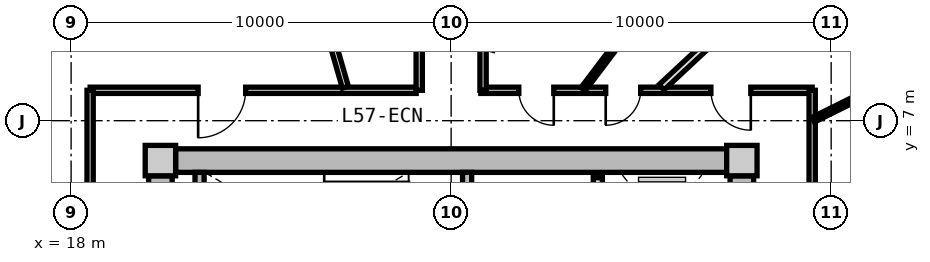
"""IFC4 building model, lengths in metres.
Left out: names, types, materials, properties, quantities, classifications, styles, units other than length and angle.
Written with IfcOpenShell. Run it as: python <this file> out.ifc"""

import sys

from ifc_helpers import new_model, si_unit, direction, frame, frame_2d, origin, origin_2d, place, context, subcontext, project, spatial, rectangle, extrude, source, transform, mapped, element, fill, save


model = new_model("IFC4")
c1 = context("Model", 3, precision=1e-05, world=origin(), true_north=direction((0.0, 1.0)))
c2 = subcontext(c1, "Body", "Model", "MODEL_VIEW")
j1 = project(units=[si_unit("LENGTHUNIT", "METRE"), si_unit("PLANEANGLEUNIT", "RADIAN")], contexts=[c1])
p1 = place(None, origin())
s1 = spatial("IfcSite", under=j1, at=p1, CompositionType="ELEMENT")
p2 = place(p1, origin())
s2 = spatial("IfcBuilding", under=s1, at=p2, CompositionType="ELEMENT")
p3 = place(p2, frame((0.0, 0.0, 183.1)))
s3 = spatial("IfcBuildingStorey", under=s2, at=p3, CompositionType="ELEMENT", Elevation=183.1)
m1 = source(origin(), c2, "Body", "SweptSolid", [
    extrude(rectangle(XDim=0.8, YDim=0.8, at=origin_2d()), origin(), (0.0, 0.0, 1.0), 3.05),
])
for number, where, z_axis, x_axis in (
    (1, (35.65, 5.95, 0.0), (0.0, 0.0, 1.0), (1.0, 0.0, 0.0)),
    (2, (20.35, 5.95, 0.0), (0.0, 0.0, 1.0), (1.0, 0.0, 0.0)),
):
    element("IfcColumn", number, at=place(p3, frame(where, z_axis=z_axis, x_axis=x_axis)), inside=s3, PredefinedType="COLUMN", context=c2, shape_type="MappedRepresentation", body=[
        mapped(m1, transform((0.0, 0.0, 0.0), x_axis=(1.0, 0.0, 0.0), y_axis=(0.0, 1.0, 0.0), z_axis=(0.0, 0.0, 1.0), scale=1.0)),
    ])
m2 = source(origin(), c2, "Body", "SweptSolid", [
    extrude(rectangle(XDim=14.5, YDim=0.62, at=frame_2d((7.25, 0.0))), origin(), (0.0, 0.0, 1.0), 2.73),
])
p4 = place(p3, frame((20.75, 5.95, 0.0), z_axis=(0.0, 0.0, 1.0), x_axis=(1.0, 0.0, 0.0)))
e3 = element("IfcWall", 3, at=p4, inside=s3, PredefinedType="SHEAR", context=c2, shape_type="MappedRepresentation", body=[
    mapped(m2, transform((0.0, 0.0, 0.0), x_axis=(1.0, 0.0, 0.0), y_axis=(0.0, 1.0, 0.0), z_axis=(0.0, 0.0, 1.0), scale=1.0)),
])
m3 = source(origin(), c2, "Body", "SweptSolid", [
    extrude(rectangle(XDim=11.1, YDim=0.62, at=frame_2d((5.55, 0.0))), origin(), (0.0, 0.0, 1.0), 2.73),
])
p5 = place(p3, frame((20.35, -5.55, 0.0), z_axis=(0.0, 0.0, 1.0), x_axis=(0.0, 1.0, 0.0)))
e4 = element("IfcWall", 4, at=p5, inside=s3, PredefinedType="SHEAR", context=c2, shape_type="MappedRepresentation", body=[
    mapped(m3, transform((0.0, 0.0, 0.0), x_axis=(1.0, 0.0, 0.0), y_axis=(0.0, 1.0, 0.0), z_axis=(0.0, 0.0, 1.0), scale=1.0)),
])
p6 = place(p5, frame((3.8, 0.0, 0.0)))
e5 = element("IfcOpeningElement", 5, at=p6, cuts=e4, PredefinedType="OPENING", context=c2, shape_type="SweptSolid", body=[
    extrude(rectangle(XDim=1.2, YDim=2.15, at=frame_2d((0.6, 1.075))), frame((0.0, 0.32, 0.0), z_axis=(0.0, -1.0, 0.0), x_axis=(1.0, 0.0, 0.0)), (0.0, 0.0, 1.0), 0.64),
])
p7 = place(p3, frame((35.65, 5.55, 0.0), z_axis=(0.0, 0.0, 1.0), x_axis=(0.0, -1.0, 0.0)))
e6 = element("IfcWall", 6, at=p7, inside=s3, PredefinedType="SHEAR", context=c2, shape_type="MappedRepresentation", body=[
    mapped(m3, transform((0.0, 0.0, 0.0), x_axis=(1.0, 0.0, 0.0), y_axis=(0.0, 1.0, 0.0), z_axis=(0.0, 0.0, 1.0), scale=1.0)),
])
p8 = place(p7, frame((5.65, 0.0, 0.0)))
e7 = element("IfcOpeningElement", 7, at=p8, cuts=e6, PredefinedType="OPENING", context=c2, shape_type="SweptSolid", body=[
    extrude(rectangle(XDim=1.2, YDim=2.15, at=frame_2d((0.6, 1.075))), frame((0.0, 0.32, 0.0), z_axis=(0.0, -1.0, 0.0), x_axis=(1.0, 0.0, 0.0)), (0.0, 0.0, 1.0), 0.64),
])
m4 = source(origin(), c2, "Body", "SweptSolid", [
    extrude(rectangle(XDim=3.19, YDim=0.24, at=frame_2d((1.595, 0.0))), origin(), (0.0, 0.0, 1.0), 2.73),
])
p9 = place(p3, frame((21.38, 2.45, 0.0), z_axis=(0.0, 0.0, 1.0), x_axis=(0.0, 1.0, 0.0)))
e8 = element("IfcWall", 8, at=p9, inside=s3, PredefinedType="PARTITIONING", context=c2, shape_type="MappedRepresentation", body=[
    mapped(m4, transform((0.0, 0.0, 0.0), x_axis=(1.0, 0.0, 0.0), y_axis=(0.0, 1.0, 0.0), z_axis=(0.0, 0.0, 1.0), scale=1.0)),
])
p10 = place(p3, frame((28.42, 2.45, 0.0), z_axis=(0.0, 0.0, 1.0), x_axis=(0.0, 1.0, 0.0)))
e9 = element("IfcWall", 9, at=p10, inside=s3, PredefinedType="PARTITIONING", context=c2, shape_type="MappedRepresentation", body=[
    mapped(m4, transform((0.0, 0.0, 0.0), x_axis=(1.0, 0.0, 0.0), y_axis=(0.0, 1.0, 0.0), z_axis=(0.0, 0.0, 1.0), scale=1.0)),
])
p11 = place(p10, frame((0.55, 0.0, 0.0)))
e10 = element("IfcOpeningElement", 10, at=p11, cuts=e9, PredefinedType="OPENING", context=c2, shape_type="SweptSolid", body=[
    extrude(rectangle(XDim=1.1, YDim=2.15, at=frame_2d((0.55, 1.075))), frame((0.0, 0.13, 0.0), z_axis=(0.0, -1.0, 0.0), x_axis=(1.0, 0.0, 0.0)), (0.0, 0.0, 1.0), 0.26),
])
m5 = source(origin(), c2, "Body", "SweptSolid", [
    extrude(rectangle(XDim=5.0, YDim=0.24, at=frame_2d((2.5, 0.0))), origin(), (0.0, 0.0, 1.0), 2.715),
])
p12 = place(p3, frame((31.86, 0.5, 0.0), z_axis=(0.0, 0.0, 1.0), x_axis=(0.0, 1.0, 0.0)))
e11 = element("IfcWall", 11, at=p12, inside=s3, PredefinedType="PARTITIONING", context=c2, shape_type="MappedRepresentation", body=[
    mapped(m5, transform((0.0, 0.0, 0.0), x_axis=(1.0, 0.0, 0.0), y_axis=(0.0, 1.0, 0.0), z_axis=(0.0, 0.0, 1.0), scale=1.0)),
])
p13 = place(p12, frame((3.05, 0.0, 0.0)))
e12 = element("IfcOpeningElement", 12, at=p13, cuts=e11, PredefinedType="OPENING", context=c2, shape_type="SweptSolid", body=[
    extrude(rectangle(XDim=1.3, YDim=2.2, at=frame_2d((0.65, 1.1))), frame((0.0, 0.13, 0.0), z_axis=(0.0, -1.0, 0.0), x_axis=(1.0, 0.0, 0.0)), (0.0, 0.0, 1.0), 0.26),
])
p14 = place(p12, frame((0.55, 0.0, 0.0)))
e13 = element("IfcOpeningElement", 13, at=p14, cuts=e11, PredefinedType="OPENING", context=c2, shape_type="SweptSolid", body=[
    extrude(rectangle(XDim=1.3, YDim=2.2, at=frame_2d((0.65, 1.1))), frame((0.0, 0.13, 0.0), z_axis=(0.0, -1.0, 0.0), x_axis=(1.0, 0.0, 0.0)), (0.0, 0.0, 1.0), 0.26),
])
m6 = source(origin(), c2, "Body", "SweptSolid", [
    extrude(rectangle(XDim=8.58, YDim=0.165, at=frame_2d((4.29, 0.0))), origin(), (0.0, 0.0, 1.0), 2.715),
])
p15 = place(p3, frame((18.5, 7.8, 0.0), z_axis=(0.0, 0.0, 1.0), x_axis=(1.0, 0.0, 0.0)))
e14 = element("IfcWall", 14, at=p15, inside=s3, PredefinedType="PARTITIONING", context=c2, shape_type="MappedRepresentation", body=[
    mapped(m6, transform((0.0, 0.0, 0.0), x_axis=(1.0, 0.0, 0.0), y_axis=(0.0, 1.0, 0.0), z_axis=(0.0, 0.0, 1.0), scale=1.0)),
])
p16 = place(p15, frame((2.843, 0.0, 0.0)))
e15 = element("IfcOpeningElement", 15, at=p16, cuts=e14, PredefinedType="OPENING", context=c2, shape_type="SweptSolid", body=[
    extrude(rectangle(XDim=1.25, YDim=2.2, at=frame_2d((0.625, 1.1))), frame((0.0, 0.093, 0.0), z_axis=(0.0, -1.0, 0.0), x_axis=(1.0, 0.0, 0.0)), (0.0, 0.0, 1.0), 0.185),
])
m7 = source(origin(), c2, "Body", "SweptSolid", [
    extrude(rectangle(XDim=8.719, YDim=0.165, at=frame_2d((4.36, 0.0))), origin(), (0.0, 0.0, 1.0), 2.715),
])
p17 = place(p3, frame((28.781, 7.8, 0.0), z_axis=(0.0, 0.0, 1.0), x_axis=(1.0, 0.0, 0.0)))
e16 = element("IfcWall", 16, at=p17, inside=s3, PredefinedType="PARTITIONING", context=c2, shape_type="MappedRepresentation", body=[
    mapped(m7, transform((0.0, 0.0, 0.0), x_axis=(1.0, 0.0, 0.0), y_axis=(0.0, 1.0, 0.0), z_axis=(0.0, 0.0, 1.0), scale=1.0)),
])
p18 = place(p17, frame((6.054, 0.0, 0.0)))
e17 = element("IfcOpeningElement", 17, at=p18, cuts=e16, PredefinedType="OPENING", context=c2, shape_type="SweptSolid", body=[
    extrude(rectangle(XDim=1.05, YDim=2.15, at=frame_2d((0.525, 1.075))), frame((0.0, 0.093, 0.0), z_axis=(0.0, -1.0, 0.0), x_axis=(1.0, 0.0, 0.0)), (0.0, 0.0, 1.0), 0.185),
])
p19 = place(p17, frame((3.287, 0.0, 0.0)))
e18 = element("IfcOpeningElement", 18, at=p19, cuts=e16, PredefinedType="OPENING", context=c2, shape_type="SweptSolid", body=[
    extrude(rectangle(XDim=0.92, YDim=2.1, at=frame_2d((0.46, 1.05))), frame((0.0, 0.093, 0.0), z_axis=(0.0, -1.0, 0.0), x_axis=(1.0, 0.0, 0.0)), (0.0, 0.0, 1.0), 0.185),
])
p20 = place(p17, frame((1.0, 0.0, 0.0)))
e19 = element("IfcOpeningElement", 19, at=p20, cuts=e16, PredefinedType="OPENING", context=c2, shape_type="SweptSolid", body=[
    extrude(rectangle(XDim=0.92, YDim=2.1, at=frame_2d((0.46, 1.05))), frame((0.0, 0.093, 0.0), z_axis=(0.0, -1.0, 0.0), x_axis=(1.0, 0.0, 0.0)), (0.0, 0.0, 1.0), 0.185),
])
m8 = source(origin(), c2, "Body", "SweptSolid", [
    extrude(rectangle(XDim=6.88, YDim=0.165, at=frame_2d((3.44, 0.0))), origin(), (0.0, 0.0, 1.0), 2.715),
])
for number, where, z_axis, x_axis in (
    (20, (18.5, 0.92, 0.0), (0.0, 0.0, 1.0), (0.0, 1.0, 0.0)),
    (21, (37.5, 7.8, 0.0), (0.0, 0.0, 1.0), (0.0, -1.0, 0.0)),
):
    element("IfcWall", number, at=place(p3, frame(where, z_axis=z_axis, x_axis=x_axis)), inside=s3, PredefinedType="PARTITIONING", context=c2, shape_type="MappedRepresentation", body=[
        mapped(m8, transform((0.0, 0.0, 0.0), x_axis=(1.0, 0.0, 0.0), y_axis=(0.0, 1.0, 0.0), z_axis=(0.0, 0.0, 1.0), scale=1.0)),
    ])
m9 = source(origin(), c2, "Body", "SweptSolid", [
    extrude(rectangle(XDim=9.73, YDim=0.165, at=frame_2d((4.865, 0.0))), origin(), (0.0, 0.0, 1.0), 2.265),
])
p21 = place(p3, frame((25.217, 7.88, 0.0), z_axis=(0.0, 0.0, 1.0), x_axis=(-0.27679492614, 0.960929013436, 0.0)))
e22 = element("IfcWall", 22, at=p21, inside=s3, PredefinedType="PARTITIONING", context=c2, shape_type="MappedRepresentation", body=[
    mapped(m9, transform((0.0, 0.0, 0.0), x_axis=(1.0, 0.0, 0.0), y_axis=(0.0, 1.0, 0.0), z_axis=(0.0, 0.0, 1.0), scale=1.0)),
])
m10 = source(origin(), c2, "Body", "SweptSolid", [
    extrude(rectangle(XDim=8.305, YDim=0.165, at=frame_2d((4.153, 0.0))), origin(), (0.0, 0.0, 1.0), 2.265),
])
p22 = place(p3, frame((18.42, 3.908, 0.0), z_axis=(0.0, 0.0, 1.0), x_axis=(-0.970309994378, 0.241864662175, 0.0)))
e23 = element("IfcWall", 23, at=p22, inside=s3, PredefinedType="PARTITIONING", context=c2, shape_type="MappedRepresentation", body=[
    mapped(m10, transform((0.0, 0.0, 0.0), x_axis=(1.0, 0.0, 0.0), y_axis=(0.0, 1.0, 0.0), z_axis=(0.0, 0.0, 1.0), scale=1.0)),
])
m11 = source(origin(), c2, "Body", "SweptSolid", [
    extrude(rectangle(XDim=6.193, YDim=0.165, at=frame_2d((3.096, 0.0))), origin(), (0.0, 0.0, 1.0), 2.265),
])
p23 = place(p3, frame((37.58, 4.419, 0.0), z_axis=(0.0, 0.0, 1.0), x_axis=(0.970309243466, 0.241867674657, 0.0)))
e24 = element("IfcWall", 24, at=p23, inside=s3, PredefinedType="PARTITIONING", context=c2, shape_type="MappedRepresentation", body=[
    mapped(m11, transform((0.0, 0.0, 0.0), x_axis=(1.0, 0.0, 0.0), y_axis=(0.0, 1.0, 0.0), z_axis=(0.0, 0.0, 1.0), scale=1.0)),
])
m12 = source(origin(), c2, "Body", "SweptSolid", [
    extrude(rectangle(XDim=9.48, YDim=0.165, at=frame_2d((4.74, 0.0))), origin(), (0.0, 0.0, 1.0), 2.715),
])
p24 = place(p3, frame((27.16, 7.8, 0.0), z_axis=(0.0, 0.0, 1.0), x_axis=(0.0, 1.0, 0.0)))
e25 = element("IfcWall", 25, at=p24, inside=s3, PredefinedType="PARTITIONING", context=c2, shape_type="MappedRepresentation", body=[
    mapped(m12, transform((0.0, 0.0, 0.0), x_axis=(1.0, 0.0, 0.0), y_axis=(0.0, 1.0, 0.0), z_axis=(0.0, 0.0, 1.0), scale=1.0)),
])
p25 = place(p24, frame((4.265, 0.0, 0.0)))
e26 = element("IfcOpeningElement", 26, at=p25, cuts=e25, PredefinedType="OPENING", context=c2, shape_type="SweptSolid", body=[
    extrude(rectangle(XDim=0.95, YDim=2.1, at=frame_2d((0.475, 1.05))), frame((0.0, 0.093, 0.0), z_axis=(0.0, -1.0, 0.0), x_axis=(1.0, 0.0, 0.0)), (0.0, 0.0, 1.0), 0.185),
])
p26 = place(p3, frame((28.84, 17.28, 0.0), z_axis=(0.0, 0.0, 1.0), x_axis=(0.0, -1.0, 0.0)))
e27 = element("IfcWall", 27, at=p26, inside=s3, PredefinedType="PARTITIONING", context=c2, shape_type="MappedRepresentation", body=[
    mapped(m12, transform((0.0, 0.0, 0.0), x_axis=(1.0, 0.0, 0.0), y_axis=(0.0, 1.0, 0.0), z_axis=(0.0, 0.0, 1.0), scale=1.0)),
])
p27 = place(p26, frame((4.01, 0.0, 0.0)))
e28 = element("IfcOpeningElement", 28, at=p27, cuts=e27, PredefinedType="OPENING", context=c2, shape_type="SweptSolid", body=[
    extrude(rectangle(XDim=0.95, YDim=2.1, at=frame_2d((0.475, 1.05))), frame((0.0, 0.093, 0.0), z_axis=(0.0, -1.0, 0.0), x_axis=(1.0, 0.0, 0.0)), (0.0, 0.0, 1.0), 0.185),
])
m13 = source(origin(), c2, "Body", "SweptSolid", [
    extrude(rectangle(XDim=7.648, YDim=0.19, at=frame_2d((3.824, 0.0))), origin(), (0.0, 0.0, 1.0), 2.265),
])
p28 = place(p3, frame((33.538, 7.88, 0.0), z_axis=(0.0, 0.0, 1.0), x_axis=(0.732167856666, 0.681124239522, 0.0)))
e29 = element("IfcWall", 29, at=p28, inside=s3, PredefinedType="PARTITIONING", context=c2, shape_type="MappedRepresentation", body=[
    mapped(m13, transform((0.0, 0.0, 0.0), x_axis=(1.0, 0.0, 0.0), y_axis=(0.0, 1.0, 0.0), z_axis=(0.0, 0.0, 1.0), scale=1.0)),
])
m14 = source(origin(), c2, "Body", "SweptSolid", [
    extrude(rectangle(XDim=2.471, YDim=0.14, at=frame_2d((1.235, 0.0))), origin(), (0.0, 0.0, 1.0), 2.715),
])
p29 = place(p3, frame((37.53, 7.026, 0.0), z_axis=(0.0, 0.0, 1.0), x_axis=(0.895295102372, 0.445473545419, 0.0)))
e30 = element("IfcWall", 30, at=p29, inside=s3, PredefinedType="PARTITIONING", context=c2, shape_type="MappedRepresentation", body=[
    mapped(m14, transform((0.0, 0.0, 0.0), x_axis=(1.0, 0.0, 0.0), y_axis=(0.0, 1.0, 0.0), z_axis=(0.0, 0.0, 1.0), scale=1.0)),
])
m15 = source(origin(), c2, "Body", "SweptSolid", [
    extrude(rectangle(XDim=8.359, YDim=0.14, at=frame_2d((4.18, 0.0))), origin(), (0.0, 0.0, 1.0), 2.715),
])
p30 = place(p3, frame((31.473, 7.83, 0.0), z_axis=(0.0, 0.0, 1.0), x_axis=(0.603265985309, 0.797540062297, 0.0)))
e31 = element("IfcWall", 31, at=p30, inside=s3, PredefinedType="PARTITIONING", context=c2, shape_type="MappedRepresentation", body=[
    mapped(m15, transform((0.0, 0.0, 0.0), x_axis=(1.0, 0.0, 0.0), y_axis=(0.0, 1.0, 0.0), z_axis=(0.0, 0.0, 1.0), scale=1.0)),
])
m16 = source(origin(), c2, "Body", "SweptSolid", [
    extrude(rectangle(XDim=1.05, YDim=2.15, at=frame_2d((0.525, 1.075))), frame((0.0, 0.025, 0.0), z_axis=(0.0, -1.0, 0.0), x_axis=(1.0, 0.0, 0.0)), (0.0, 0.0, 1.0), 0.05),
])
p31 = place(p18, frame((1.05, 0.0, 0.0), z_axis=(0.0, 0.0, 1.0), x_axis=(-1.0, 0.0, 0.0)))
e32 = element("IfcDoor", 32, at=p31, inside=s3, OperationType="SINGLE_SWING_LEFT", PredefinedType="DOOR", context=c2, shape_type="MappedRepresentation", body=[
    mapped(m16, transform((0.0, 0.0, 0.0), x_axis=(1.0, 0.0, 0.0), y_axis=(0.0, 1.0, 0.0), z_axis=(0.0, 0.0, 1.0), scale=1.0)),
])
fill(e17, e32)
m17 = source(origin(), c2, "Body", "SweptSolid", [
    extrude(rectangle(XDim=0.92, YDim=2.1, at=frame_2d((0.46, 1.05))), frame((0.0, 0.025, 0.0), z_axis=(0.0, -1.0, 0.0), x_axis=(1.0, 0.0, 0.0)), (0.0, 0.0, 1.0), 0.05),
])
p32 = place(p19, frame((0.92, 0.0, 0.0), z_axis=(0.0, 0.0, 1.0), x_axis=(-1.0, 0.0, 0.0)))
e33 = element("IfcDoor", 33, at=p32, inside=s3, OperationType="SINGLE_SWING_RIGHT", PredefinedType="DOOR", context=c2, shape_type="MappedRepresentation", body=[
    mapped(m17, transform((0.0, 0.0, 0.0), x_axis=(1.0, 0.0, 0.0), y_axis=(0.0, 1.0, 0.0), z_axis=(0.0, 0.0, 1.0), scale=1.0)),
])
fill(e18, e33)
p33 = place(p20, frame((0.92, 0.0, 0.0), z_axis=(0.0, 0.0, 1.0), x_axis=(-1.0, 0.0, 0.0)))
e34 = element("IfcDoor", 34, at=p33, inside=s3, OperationType="SINGLE_SWING_LEFT", PredefinedType="DOOR", context=c2, shape_type="MappedRepresentation", body=[
    mapped(m17, transform((0.0, 0.0, 0.0), x_axis=(1.0, 0.0, 0.0), y_axis=(0.0, 1.0, 0.0), z_axis=(0.0, 0.0, 1.0), scale=1.0)),
])
fill(e19, e34)
m18 = source(origin(), c2, "Body", "SweptSolid", [
    extrude(rectangle(XDim=1.25, YDim=2.2, at=frame_2d((0.625, 1.1))), frame((0.0, 0.025, 0.0), z_axis=(0.0, -1.0, 0.0), x_axis=(1.0, 0.0, 0.0)), (0.0, 0.0, 1.0), 0.05),
])
p34 = place(p16, frame((1.25, 0.0, 0.0), z_axis=(0.0, 0.0, 1.0), x_axis=(-1.0, 0.0, 0.0)))
e35 = element("IfcDoor", 35, at=p34, inside=s3, OperationType="SINGLE_SWING_RIGHT", PredefinedType="DOOR", context=c2, shape_type="MappedRepresentation", body=[
    mapped(m18, transform((0.0, 0.0, 0.0), x_axis=(1.0, 0.0, 0.0), y_axis=(0.0, 1.0, 0.0), z_axis=(0.0, 0.0, 1.0), scale=1.0)),
])
fill(e15, e35)
save(model, sys.argv[1])
